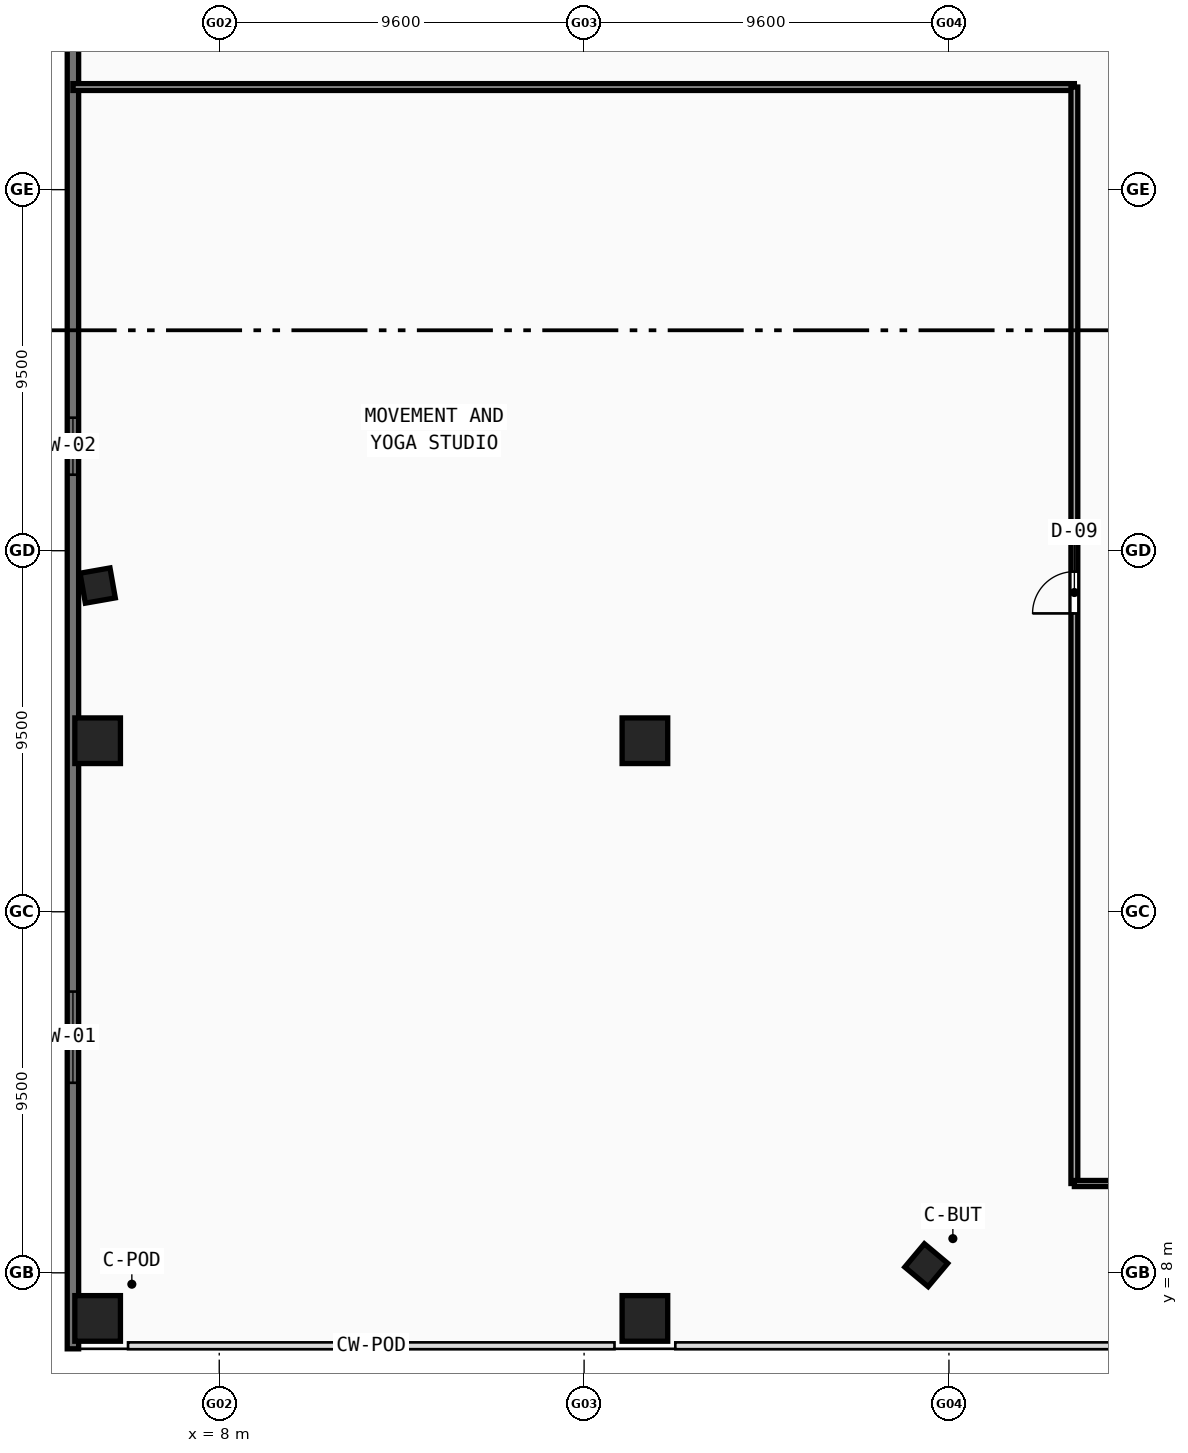
"""IFC4 building model, lengths in metres.
Left out: names, types, materials, properties, quantities, classifications, styles, units other than length and angle.
Written with IfcOpenShell. Run it as: python <this file> out.ifc"""

import sys

from ifc_helpers import new_model, si_unit, direction, frame, frame_2d, origin, origin_with_axes, origin_2d, place, context, subcontext, project, spatial, rectangle, hollow_rectangle, extrude, source, transform, mapped, element, fill, save


model = new_model("IFC4")
c1 = context("Model", 3, precision=1e-05, world=origin(), true_north=direction((0.0, 1.0)))
c2 = subcontext(c1, "Body", "Model", "MODEL_VIEW")
j1 = project(units=[si_unit("LENGTHUNIT", "METRE"), si_unit("PLANEANGLEUNIT", "RADIAN")], contexts=[c1])
p1 = place(None, origin())
s1 = spatial("IfcSite", under=j1, at=p1, CompositionType="ELEMENT")
p2 = place(p1, origin())
s2 = spatial("IfcBuilding", under=s1, at=p2, CompositionType="ELEMENT")
p3 = place(p2, frame((0.0, 0.0, 19.2)))
s3 = spatial("IfcBuildingStorey", under=s2, at=p3, CompositionType="ELEMENT", Elevation=19.2)
m1 = source(origin(), c2, "Body", "SweptSolid", [
    extrude(hollow_rectangle(XDim=1.2, YDim=1.2, WallThickness=0.05, at=origin_2d()), origin(), (0.0, 0.0, 1.0), 6.2),
])
for number, where, z_axis, x_axis in (
    (1, (4.8, 6.8, -0.28), (0.0, 0.0, 1.0), (1.0, 0.0, 0.0)),
    (2, (4.8, 22.0, -0.28), (0.0, 0.0, 1.0), (1.0, 0.0, 0.0)),
    (3, (19.2, 6.8, -0.28), (0.0, 0.0, 1.0), (1.0, 0.0, 0.0)),
    (4, (19.2, 22.0, -0.28), (0.0, 0.0, 1.0), (1.0, 0.0, 0.0)),
):
    element("IfcColumn", number, at=place(p3, frame(where, z_axis=z_axis, x_axis=x_axis)), inside=s3, PredefinedType="COLUMN", context=c2, shape_type="MappedRepresentation", body=[
        mapped(m1, transform((0.0, 0.0, 0.0), scale=1.0)),
    ])
m2 = source(origin(), c2, "Body", "SweptSolid", [
    extrude(hollow_rectangle(XDim=0.8, YDim=0.8, WallThickness=0.032, at=origin_2d()), origin(), (0.0, 0.0, 1.0), 6.2),
])
for number, where, z_axis, x_axis in (
    (5, (26.603, 8.2, -0.28), (0.0, 0.0, 1.0), (0.766, -0.643, 0.0)),
    (6, (4.801, 26.083, -0.28), (0.0, 0.0, 1.0), (0.174, -0.985, 0.0)),
):
    element("IfcColumn", number, at=place(p3, frame(where, z_axis=z_axis, x_axis=x_axis)), inside=s3, PredefinedType="COLUMN", context=c2, shape_type="MappedRepresentation", body=[
        mapped(m2, transform((0.0, 0.0, 0.0), scale=1.0)),
    ])
p4 = place(p3, frame((4.15, 6.0, 0.0), z_axis=(0.0, 0.0, 1.0), x_axis=(0.0, 1.0, 0.0)))
e7 = element("IfcWall", 7, at=p4, inside=s3, PredefinedType="STANDARD", context=c2, shape_type="SweptSolid", body=[
    extrude(rectangle(XDim=76.0, YDim=0.3, at=frame_2d((38.0, 0.0))), origin(), (0.0, 0.0, 1.0), 5.92),
])
p5 = place(p4, frame((7.0, 0.0, 0.9)))
e8 = element("IfcOpeningElement", 8, at=p5, cuts=e7, PredefinedType="OPENING", context=c2, shape_type="SweptSolid", body=[
    extrude(rectangle(XDim=2.4, YDim=1.8, at=frame_2d((1.2, 0.9))), frame((0.0, 0.16, 0.0), z_axis=(0.0, -1.0, 0.0), x_axis=(1.0, 0.0, 0.0)), (0.0, 0.0, 1.0), 0.32),
])
p6 = place(p4, frame((23.0, 0.0, 0.9)))
e9 = element("IfcOpeningElement", 9, at=p6, cuts=e7, PredefinedType="OPENING", context=c2, shape_type="SweptSolid", body=[
    extrude(rectangle(XDim=1.5, YDim=1.6, at=frame_2d((0.75, 0.8))), frame((0.0, 0.16, 0.0), z_axis=(0.0, -1.0, 0.0), x_axis=(1.0, 0.0, 0.0)), (0.0, 0.0, 1.0), 0.32),
])
p7 = place(p4, frame((43.0, 0.0, 0.9)))
e10 = element("IfcOpeningElement", 10, at=p7, cuts=e7, PredefinedType="OPENING", context=c2, shape_type="SweptSolid", body=[
    extrude(rectangle(XDim=2.4, YDim=1.8, at=frame_2d((1.2, 0.9))), frame((0.0, 0.16, 0.0), z_axis=(0.0, -1.0, 0.0), x_axis=(1.0, 0.0, 0.0)), (0.0, 0.0, 1.0), 0.32),
])
p8 = place(p4, frame((63.0, 0.0, 0.9)))
e11 = element("IfcOpeningElement", 11, at=p8, cuts=e7, PredefinedType="OPENING", context=c2, shape_type="SweptSolid", body=[
    extrude(rectangle(XDim=1.5, YDim=1.6, at=frame_2d((0.75, 0.8))), frame((0.0, 0.16, 0.0), z_axis=(0.0, -1.0, 0.0), x_axis=(1.0, 0.0, 0.0)), (0.0, 0.0, 1.0), 0.32),
])
p9 = place(p3, frame((4.15, 39.2, 0.0), z_axis=(0.0, 0.0, 1.0), x_axis=(1.0, 0.0, 0.0)))
e12 = element("IfcWall", 12, at=p9, inside=s3, PredefinedType="PARTITIONING", context=c2, shape_type="SweptSolid", body=[
    extrude(rectangle(XDim=26.35, YDim=0.18, at=frame_2d((13.175, 0.0))), origin(), (0.0, 0.0, 1.0), 2.42),
])
p10 = place(p3, frame((30.5, 10.35, 0.0), z_axis=(0.0, 0.0, 1.0), x_axis=(0.0, 1.0, 0.0)))
e13 = element("IfcWall", 13, at=p10, inside=s3, PredefinedType="PARTITIONING", context=c2, shape_type="SweptSolid", body=[
    extrude(rectangle(XDim=28.85, YDim=0.18, at=frame_2d((14.425, 0.0))), origin(), (0.0, 0.0, 1.0), 2.42),
])
p11 = place(p10, frame((15.0, 0.0, 0.0)))
e14 = element("IfcOpeningElement", 14, at=p11, cuts=e13, PredefinedType="OPENING", context=c2, shape_type="SweptSolid", body=[
    extrude(rectangle(XDim=1.1, YDim=2.15, at=frame_2d((0.55, 1.075))), frame((0.0, 0.1, 0.0), z_axis=(0.0, -1.0, 0.0), x_axis=(1.0, 0.0, 0.0)), (0.0, 0.0, 1.0), 0.2),
])
p12 = place(p3, frame((30.5, 10.35, 0.0), z_axis=(0.0, 0.0, 1.0), x_axis=(1.0, 0.0, 0.0)))
e15 = element("IfcWall", 15, at=p12, inside=s3, PredefinedType="PARTITIONING", context=c2, shape_type="SweptSolid", body=[
    extrude(rectangle(XDim=35.0, YDim=0.16, at=frame_2d((17.5, 0.0))), origin(), (0.0, 0.0, 1.0), 2.42),
])
m3 = source(origin(), c2, "Body", "SweptSolid", [
    extrude(rectangle(XDim=2.4, YDim=1.8, at=frame_2d((1.2, 0.9))), frame((0.0, 0.03, 0.0), z_axis=(0.0, -1.0, 0.0), x_axis=(1.0, 0.0, 0.0)), (0.0, 0.0, 1.0), 0.06),
])
p13 = place(p5, origin_with_axes())
e16 = element("IfcWindow", 16, at=p13, inside=s3, PartitioningType="SINGLE_PANEL", PredefinedType="WINDOW", context=c2, shape_type="MappedRepresentation", body=[
    mapped(m3, transform((0.0, 0.0, 0.0), scale=1.0)),
])
fill(e8, e16)
m4 = source(origin(), c2, "Body", "SweptSolid", [
    extrude(rectangle(XDim=1.5, YDim=1.6, at=frame_2d((0.75, 0.8))), frame((0.0, 0.03, 0.0), z_axis=(0.0, -1.0, 0.0), x_axis=(1.0, 0.0, 0.0)), (0.0, 0.0, 1.0), 0.06),
])
p14 = place(p6, origin_with_axes())
e17 = element("IfcWindow", 17, at=p14, inside=s3, PartitioningType="SINGLE_PANEL", PredefinedType="WINDOW", context=c2, shape_type="MappedRepresentation", body=[
    mapped(m4, transform((0.0, 0.0, 0.0), scale=1.0)),
])
fill(e9, e17)
m5 = source(origin(), c2, "Body", "SweptSolid", [
    extrude(rectangle(XDim=1.1, YDim=2.15, at=frame_2d((0.55, 1.075))), frame((0.0, 0.025, 0.0), z_axis=(0.0, -1.0, 0.0), x_axis=(1.0, 0.0, 0.0)), (0.0, 0.0, 1.0), 0.05),
])
p15 = place(p11, origin_with_axes())
e18 = element("IfcDoor", 18, at=p15, inside=s3, OperationType="SINGLE_SWING_LEFT", PredefinedType="DOOR", context=c2, shape_type="MappedRepresentation", body=[
    mapped(m5, transform((0.0, 0.0, 0.0), scale=1.0)),
])
fill(e14, e18)
save(model, sys.argv[1])
